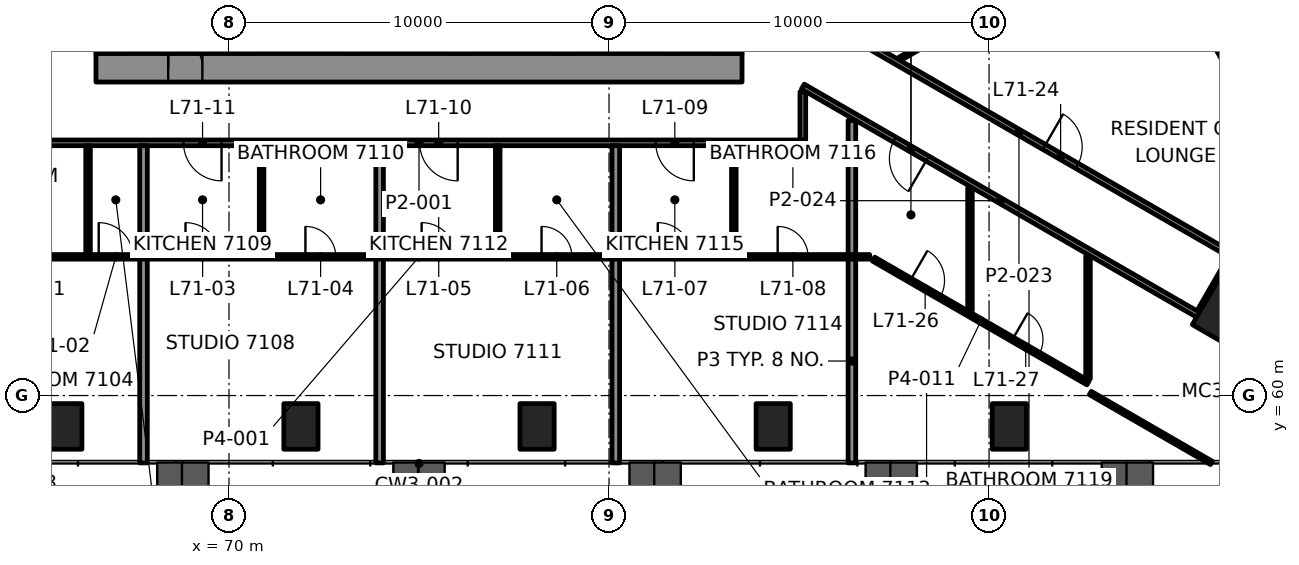
"""IFC4 building model, lengths in metres.
Left out: names, types, materials, properties, quantities, classifications, styles, units other than length and angle.
Written with IfcOpenShell. Run it as: python <this file> out.ifc"""

import sys

from ifc_helpers import new_model, si_unit, direction, frame, frame_2d, origin, origin_2d, place, context, subcontext, project, spatial, rectangle, hollow_rectangle, extrude, element, fill, save


model = new_model("IFC4")
c1 = context("Model", 3, precision=1e-05, world=origin(), true_north=direction((0.0, 1.0)))
c2 = subcontext(c1, "Body", "Model", "MODEL_VIEW")
j1 = project(units=[si_unit("LENGTHUNIT", "METRE"), si_unit("PLANEANGLEUNIT", "RADIAN")], contexts=[c1])
p1 = place(None, origin())
s1 = spatial("IfcSite", under=j1, at=p1, CompositionType="ELEMENT")
p2 = place(p1, origin())
s2 = spatial("IfcBuilding", under=s1, at=p2, CompositionType="ELEMENT")
p3 = place(p2, frame((0.0, 0.0, 295.1)))
s3 = spatial("IfcBuildingStorey", under=s2, at=p3, CompositionType="ELEMENT", Elevation=295.1)
p4 = place(p3, frame((96.988, 62.305, 0.0), z_axis=(0.0, 0.0, 1.0), x_axis=(0.5, 0.866025403784, 0.0)))
e1 = element("IfcColumn", 1, at=p4, inside=s3, PredefinedType="COLUMN", context=c2, shape_type="SweptSolid", body=[
    extrude(rectangle(XDim=2.4, YDim=2.4, at=origin_2d()), origin(), (0.0, 0.0, 1.0), 3.5),
])
for number, where, z_axis, x_axis in (
    (2, (65.68, 59.188, -0.0), (0.0, 0.0, 1.0), (1.0, 0.0, 0.0)),
    (3, (71.893, 59.188, -0.0), (0.0, 0.0, 1.0), (1.0, 0.0, 0.0)),
    (4, (78.107, 59.188, -0.0), (0.0, 0.0, 1.0), (1.0, 0.0, 0.0)),
    (5, (84.32, 59.188, -0.0), (0.0, 0.0, 1.0), (1.0, 0.0, 0.0)),
    (6, (90.533, 59.188, -0.0), (0.0, 0.0, 1.0), (1.0, 0.0, 0.0)),
    (7, (96.461, 69.454, -0.0), (0.0, 0.0, 1.0), (-0.5, 0.866, 0.0)),
):
    element("IfcColumn", number, at=place(p3, frame(where, z_axis=z_axis, x_axis=x_axis)), inside=s3, PredefinedType="COLUMN", context=c2, shape_type="SweptSolid", body=[
        extrude(hollow_rectangle(XDim=0.9, YDim=1.2, WallThickness=0.06, at=origin_2d()), origin(), (0.0, 0.0, 1.0), 3.5),
    ])
p5 = place(p3, frame((66.5, 68.625, 0.0), z_axis=(0.0, 0.0, 1.0), x_axis=(1.0, 0.0, 0.0)))
e8 = element("IfcWall", 8, at=p5, inside=s3, PredefinedType="SHEAR", context=c2, shape_type="SweptSolid", body=[
    extrude(rectangle(XDim=17.0, YDim=0.75, at=frame_2d((8.5, 0.0))), origin(), (0.0, 0.0, 1.0), 3.3),
])
p6 = place(p5, frame((1.9, 0.0, 0.0)))
e9 = element("IfcOpeningElement", 9, at=p6, cuts=e8, PredefinedType="OPENING", context=c2, shape_type="SweptSolid", body=[
    extrude(rectangle(XDim=0.9, YDim=2.1, at=frame_2d((0.45, 1.05))), frame((0.0, 0.385, 0.0), z_axis=(0.0, -1.0, 0.0), x_axis=(1.0, 0.0, 0.0)), (0.0, 0.0, 1.0), 0.77),
])
p7 = place(p3, frame((66.875, 69.0, 0.0), z_axis=(0.0, 0.0, 1.0), x_axis=(0.0, 1.0, 0.0)))
e10 = element("IfcWall", 10, at=p7, inside=s3, PredefinedType="SHEAR", context=c2, shape_type="SweptSolid", body=[
    extrude(rectangle(XDim=12.0, YDim=0.75, at=frame_2d((6.0, 0.0))), origin(), (0.0, 0.0, 1.0), 3.3),
])
p8 = place(p7, frame((3.7, 0.0, 0.0)))
e11 = element("IfcOpeningElement", 11, at=p8, cuts=e10, PredefinedType="OPENING", context=c2, shape_type="SweptSolid", body=[
    extrude(rectangle(XDim=1.2, YDim=2.1, at=frame_2d((0.6, 1.05))), frame((0.0, 0.385, 0.0), z_axis=(0.0, -1.0, 0.0), x_axis=(1.0, 0.0, 0.0)), (0.0, 0.0, 1.0), 0.77),
])
p9 = place(p3, frame((83.125, 69.0, 0.0), z_axis=(0.0, 0.0, 1.0), x_axis=(0.0, 1.0, 0.0)))
e12 = element("IfcWall", 12, at=p9, inside=s3, PredefinedType="SHEAR", context=c2, shape_type="SweptSolid", body=[
    extrude(rectangle(XDim=12.0, YDim=0.75, at=frame_2d((6.0, 0.0))), origin(), (0.0, 0.0, 1.0), 3.3),
])
p10 = place(p9, frame((3.4, 0.0, 0.0)))
e13 = element("IfcOpeningElement", 13, at=p10, cuts=e12, PredefinedType="OPENING", context=c2, shape_type="SweptSolid", body=[
    extrude(rectangle(XDim=1.8, YDim=2.1, at=frame_2d((0.9, 1.05))), frame((0.0, 0.385, 0.0), z_axis=(0.0, -1.0, 0.0), x_axis=(1.0, 0.0, 0.0)), (0.0, 0.0, 1.0), 0.77),
])
for number, where, z_axis, x_axis in (
    (14, (70.45, 69.0, 0.0), (0.0, 0.0, 1.0), (0.0, 1.0, 0.0)),
    (15, (73.25, 69.0, 0.0), (0.0, 0.0, 1.0), (0.0, 1.0, 0.0)),
    (16, (76.05, 69.0, 0.0), (0.0, 0.0, 1.0), (0.0, 1.0, 0.0)),
    (17, (78.85, 69.0, 0.0), (0.0, 0.0, 1.0), (0.0, 1.0, 0.0)),
    (18, (81.65, 69.0, 0.0), (0.0, 0.0, 1.0), (0.0, 1.0, 0.0)),
):
    element("IfcWall", number, at=place(p3, frame(where, z_axis=z_axis, x_axis=x_axis)), inside=s3, PredefinedType="SHEAR", context=c2, shape_type="SweptSolid", body=[
        extrude(rectangle(XDim=2.6, YDim=0.3, at=frame_2d((1.3, 0.0))), origin(), (0.0, 0.0, 1.0), 3.3),
    ])
p11 = place(p3, frame((63.141, 63.65, 0.0), z_axis=(0.0, 0.0, 1.0), x_axis=(1.0, 0.0, 0.0)))
e19 = element("IfcWall", 19, at=p11, inside=s3, PredefinedType="PARTITIONING", context=c2, shape_type="SweptSolid", body=[
    extrude(rectangle(XDim=23.718, YDim=0.12, at=frame_2d((11.859, 0.0))), origin(), (0.0, 0.0, 1.0), 2.7),
])
p12 = place(p11, frame((1.276, 0.0, 0.0)))
e20 = element("IfcOpeningElement", 20, at=p12, cuts=e19, PredefinedType="OPENING", context=c2, shape_type="SweptSolid", body=[
    extrude(rectangle(XDim=0.8, YDim=2.1, at=frame_2d((0.4, 1.05))), frame((0.0, 0.07, 0.0), z_axis=(0.0, -1.0, 0.0), x_axis=(1.0, 0.0, 0.0)), (0.0, 0.0, 1.0), 0.14),
])
p13 = place(p11, frame((3.43, 0.0, 0.0)))
e21 = element("IfcOpeningElement", 21, at=p13, cuts=e19, PredefinedType="OPENING", context=c2, shape_type="SweptSolid", body=[
    extrude(rectangle(XDim=0.9, YDim=2.1, at=frame_2d((0.45, 1.05))), frame((0.0, 0.07, 0.0), z_axis=(0.0, -1.0, 0.0), x_axis=(1.0, 0.0, 0.0)), (0.0, 0.0, 1.0), 0.14),
])
p14 = place(p11, frame((5.715, 0.0, 0.0)))
e22 = element("IfcOpeningElement", 22, at=p14, cuts=e19, PredefinedType="OPENING", context=c2, shape_type="SweptSolid", body=[
    extrude(rectangle(XDim=0.9, YDim=2.1, at=frame_2d((0.45, 1.05))), frame((0.0, 0.07, 0.0), z_axis=(0.0, -1.0, 0.0), x_axis=(1.0, 0.0, 0.0)), (0.0, 0.0, 1.0), 0.14),
])
p15 = place(p11, frame((8.87, 0.0, 0.0)))
e23 = element("IfcOpeningElement", 23, at=p15, cuts=e19, PredefinedType="OPENING", context=c2, shape_type="SweptSolid", body=[
    extrude(rectangle(XDim=0.8, YDim=2.1, at=frame_2d((0.4, 1.05))), frame((0.0, 0.07, 0.0), z_axis=(0.0, -1.0, 0.0), x_axis=(1.0, 0.0, 0.0)), (0.0, 0.0, 1.0), 0.14),
])
p16 = place(p11, frame((11.928, 0.0, 0.0)))
e24 = element("IfcOpeningElement", 24, at=p16, cuts=e19, PredefinedType="OPENING", context=c2, shape_type="SweptSolid", body=[
    extrude(rectangle(XDim=0.9, YDim=2.1, at=frame_2d((0.45, 1.05))), frame((0.0, 0.07, 0.0), z_axis=(0.0, -1.0, 0.0), x_axis=(1.0, 0.0, 0.0)), (0.0, 0.0, 1.0), 0.14),
])
p17 = place(p11, frame((15.083, 0.0, 0.0)))
e25 = element("IfcOpeningElement", 25, at=p17, cuts=e19, PredefinedType="OPENING", context=c2, shape_type="SweptSolid", body=[
    extrude(rectangle(XDim=0.8, YDim=2.1, at=frame_2d((0.4, 1.05))), frame((0.0, 0.07, 0.0), z_axis=(0.0, -1.0, 0.0), x_axis=(1.0, 0.0, 0.0)), (0.0, 0.0, 1.0), 0.14),
])
p18 = place(p11, frame((18.141, 0.0, 0.0)))
e26 = element("IfcOpeningElement", 26, at=p18, cuts=e19, PredefinedType="OPENING", context=c2, shape_type="SweptSolid", body=[
    extrude(rectangle(XDim=0.9, YDim=2.1, at=frame_2d((0.45, 1.05))), frame((0.0, 0.07, 0.0), z_axis=(0.0, -1.0, 0.0), x_axis=(1.0, 0.0, 0.0)), (0.0, 0.0, 1.0), 0.14),
])
p19 = place(p11, frame((21.297, 0.0, 0.0)))
e27 = element("IfcOpeningElement", 27, at=p19, cuts=e19, PredefinedType="OPENING", context=c2, shape_type="SweptSolid", body=[
    extrude(rectangle(XDim=0.8, YDim=2.1, at=frame_2d((0.4, 1.05))), frame((0.0, 0.07, 0.0), z_axis=(0.0, -1.0, 0.0), x_axis=(1.0, 0.0, 0.0)), (0.0, 0.0, 1.0), 0.14),
])
p20 = place(p3, frame((85.1, 66.65, 0.0), z_axis=(0.0, 0.0, 1.0), x_axis=(-1.0, 0.0, 0.0)))
e28 = element("IfcWall", 28, at=p20, inside=s3, PredefinedType="PARTITIONING", context=c2, shape_type="SweptSolid", body=[
    extrude(rectangle(XDim=20.2, YDim=0.15, at=frame_2d((10.1, 0.0))), origin(), (0.0, 0.0, 1.0), 2.7),
])
p21 = place(p20, frame((2.869, 0.0, 0.0)))
e29 = element("IfcOpeningElement", 29, at=p21, cuts=e28, PredefinedType="OPENING", context=c2, shape_type="SweptSolid", body=[
    extrude(rectangle(XDim=1.0, YDim=2.1, at=frame_2d((0.5, 1.05))), frame((0.0, 0.085, 0.0), z_axis=(0.0, -1.0, 0.0), x_axis=(1.0, 0.0, 0.0)), (0.0, 0.0, 1.0), 0.17),
])
p22 = place(p20, frame((9.082, 0.0, 0.0)))
e30 = element("IfcOpeningElement", 30, at=p22, cuts=e28, PredefinedType="OPENING", context=c2, shape_type="SweptSolid", body=[
    extrude(rectangle(XDim=1.0, YDim=2.1, at=frame_2d((0.5, 1.05))), frame((0.0, 0.085, 0.0), z_axis=(0.0, -1.0, 0.0), x_axis=(1.0, 0.0, 0.0)), (0.0, 0.0, 1.0), 0.17),
])
p23 = place(p20, frame((15.296, 0.0, 0.0)))
e31 = element("IfcOpeningElement", 31, at=p23, cuts=e28, PredefinedType="OPENING", context=c2, shape_type="SweptSolid", body=[
    extrude(rectangle(XDim=1.0, YDim=2.1, at=frame_2d((0.5, 1.05))), frame((0.0, 0.085, 0.0), z_axis=(0.0, -1.0, 0.0), x_axis=(1.0, 0.0, 0.0)), (0.0, 0.0, 1.0), 0.17),
])
p24 = place(p3, frame((87.645, 68.855, 0.0), z_axis=(0.0, 0.0, 1.0), x_axis=(0.866023307551, 0.500003630766, 0.0)))
e32 = element("IfcWall", 32, at=p24, inside=s3, PredefinedType="PARTITIONING", context=c2, shape_type="SweptSolid", body=[
    extrude(rectangle(XDim=8.894, YDim=0.1, at=frame_2d((4.447, 0.0))), origin(), (0.0, 0.0, 1.0), 2.688),
])
p25 = place(p3, frame((95.536, 62.191, 0.0), z_axis=(0.0, 0.0, 1.0), x_axis=(0.500008692254, 0.866020385251, 0.0)))
e33 = element("IfcWall", 33, at=p25, inside=s3, PredefinedType="PARTITIONING", context=c2, shape_type="SweptSolid", body=[
    extrude(rectangle(XDim=1.649, YDim=0.15, at=frame_2d((0.824, 0.0))), origin(), (0.0, 0.0, 1.0), 2.547),
])
p26 = place(p3, frame((92.604, 60.442, 0.0), z_axis=(0.0, 0.0, 1.0), x_axis=(0.0, 1.0, 0.0)))
e34 = element("IfcWall", 34, at=p26, inside=s3, PredefinedType="PARTITIONING", context=c2, shape_type="SweptSolid", body=[
    extrude(rectangle(XDim=3.228, YDim=0.12, at=frame_2d((1.614, 0.0))), origin(), (0.0, 0.0, 1.0), 2.7),
])
p27 = place(p3, frame((89.498, 62.236, 0.0), z_axis=(0.0, 0.0, 1.0), x_axis=(0.0, 1.0, 0.0)))
e35 = element("IfcWall", 35, at=p27, inside=s3, PredefinedType="PARTITIONING", context=c2, shape_type="SweptSolid", body=[
    extrude(rectangle(XDim=3.228, YDim=0.12, at=frame_2d((1.614, 0.0))), origin(), (0.0, 0.0, 1.0), 2.547),
])
p28 = place(p3, frame((86.391, 58.228, 0.0), z_axis=(0.0, 0.0, 1.0), x_axis=(0.0, 1.0, 0.0)))
e36 = element("IfcWall", 36, at=p28, inside=s3, PredefinedType="PARTITIONING", context=c2, shape_type="SweptSolid", body=[
    extrude(rectangle(XDim=5.363, YDim=0.2, at=frame_2d((2.681, 0.0))), origin(), (0.0, 0.0, 1.0), 2.7),
])
p29 = place(p3, frame((85.1, 66.725, 0.0), z_axis=(0.0, 0.0, 1.0), x_axis=(0.0, 1.0, 0.0)))
e37 = element("IfcWall", 37, at=p29, inside=s3, PredefinedType="PARTITIONING", context=c2, shape_type="SweptSolid", body=[
    extrude(rectangle(XDim=1.268, YDim=0.15, at=frame_2d((0.634, 0.0))), origin(), (0.0, 0.0, 1.0), 2.547),
])
p30 = place(p3, frame((83.284, 63.71, 0.0), z_axis=(0.0, 0.0, 1.0), x_axis=(0.0, 1.0, 0.0)))
e38 = element("IfcWall", 38, at=p30, inside=s3, PredefinedType="PARTITIONING", context=c2, shape_type="SweptSolid", body=[
    extrude(rectangle(XDim=2.865, YDim=0.12, at=frame_2d((1.433, 0.0))), origin(), (0.0, 0.0, 1.0), 2.7),
])
p31 = place(p3, frame((80.178, 58.228, 0.0), z_axis=(0.0, 0.0, 1.0), x_axis=(0.0, 1.0, 0.0)))
e39 = element("IfcWall", 39, at=p31, inside=s3, PredefinedType="PARTITIONING", context=c2, shape_type="SweptSolid", body=[
    extrude(rectangle(XDim=5.363, YDim=0.2, at=frame_2d((2.681, 0.0))), origin(), (0.0, 0.0, 1.0), 2.688),
])
p32 = place(p3, frame((77.071, 63.71, 0.0), z_axis=(0.0, 0.0, 1.0), x_axis=(0.0, 1.0, 0.0)))
e40 = element("IfcWall", 40, at=p32, inside=s3, PredefinedType="PARTITIONING", context=c2, shape_type="SweptSolid", body=[
    extrude(rectangle(XDim=2.865, YDim=0.12, at=frame_2d((1.433, 0.0))), origin(), (0.0, 0.0, 1.0), 2.7),
])
p33 = place(p3, frame((73.964, 58.228, 0.0), z_axis=(0.0, 0.0, 1.0), x_axis=(0.0, 1.0, 0.0)))
e41 = element("IfcWall", 41, at=p33, inside=s3, PredefinedType="PARTITIONING", context=c2, shape_type="SweptSolid", body=[
    extrude(rectangle(XDim=5.363, YDim=0.2, at=frame_2d((2.681, 0.0))), origin(), (0.0, 0.0, 1.0), 2.688),
])
p34 = place(p3, frame((70.858, 63.71, 0.0), z_axis=(0.0, 0.0, 1.0), x_axis=(0.0, 1.0, 0.0)))
e42 = element("IfcWall", 42, at=p34, inside=s3, PredefinedType="PARTITIONING", context=c2, shape_type="SweptSolid", body=[
    extrude(rectangle(XDim=2.865, YDim=0.12, at=frame_2d((1.433, 0.0))), origin(), (0.0, 0.0, 1.0), 2.7),
])
p35 = place(p3, frame((67.751, 58.228, 0.0), z_axis=(0.0, 0.0, 1.0), x_axis=(0.0, 1.0, 0.0)))
e43 = element("IfcWall", 43, at=p35, inside=s3, PredefinedType="PARTITIONING", context=c2, shape_type="SweptSolid", body=[
    extrude(rectangle(XDim=5.363, YDim=0.2, at=frame_2d((2.681, 0.0))), origin(), (0.0, 0.0, 1.0), 2.688),
])
p36 = place(p3, frame((66.292, 63.71, 0.0), z_axis=(0.0, 0.0, 1.0), x_axis=(0.0, 1.0, 0.0)))
e44 = element("IfcWall", 44, at=p36, inside=s3, PredefinedType="PARTITIONING", context=c2, shape_type="SweptSolid", body=[
    extrude(rectangle(XDim=2.865, YDim=0.12, at=frame_2d((1.433, 0.0))), origin(), (0.0, 0.0, 1.0), 2.7),
])
p37 = place(p3, frame((85.175, 70.165, 0.0), z_axis=(0.0, 0.0, 1.0), x_axis=(0.866023706001, -0.500002940635, 0.0)))
e45 = element("IfcWall", 45, at=p37, inside=s3, PredefinedType="PARTITIONING", context=c2, shape_type="SweptSolid", body=[
    extrude(rectangle(XDim=12.959, YDim=0.15, at=frame_2d((6.48, 0.0))), origin(), (0.0, 0.0, 1.0), 2.7),
])
p38 = place(p37, frame((7.246, 0.0, 0.0)))
e46 = element("IfcOpeningElement", 46, at=p38, cuts=e45, PredefinedType="OPENING", context=c2, shape_type="SweptSolid", body=[
    extrude(rectangle(XDim=1.0, YDim=2.1, at=frame_2d((0.5, 1.05))), frame((0.0, 0.085, 0.0), z_axis=(0.0, -1.0, 0.0), x_axis=(1.0, 0.0, 0.0)), (0.0, 0.0, 1.0), 0.17),
])
p39 = place(p3, frame((95.498, 62.126, 0.0), z_axis=(0.0, 0.0, 1.0), x_axis=(-0.866024746207, 0.500001138955, 0.0)))
e47 = element("IfcWall", 47, at=p39, inside=s3, PredefinedType="PARTITIONING", context=c2, shape_type="SweptSolid", body=[
    extrude(rectangle(XDim=12.007, YDim=0.15, at=frame_2d((6.003, 0.0))), origin(), (0.0, 0.0, 1.0), 2.547),
])
p40 = place(p39, frame((8.222, 0.0, 0.0)))
e48 = element("IfcOpeningElement", 48, at=p40, cuts=e47, PredefinedType="OPENING", context=c2, shape_type="SweptSolid", body=[
    extrude(rectangle(XDim=1.0, YDim=2.1, at=frame_2d((0.5, 1.05))), frame((0.0, 0.085, 0.0), z_axis=(0.0, -1.0, 0.0), x_axis=(1.0, 0.0, 0.0)), (0.0, 0.0, 1.0), 0.17),
])
p41 = place(p3, frame((86.963, 63.59, 0.0), z_axis=(0.0, 0.0, 1.0), x_axis=(0.866025198843, -0.500000354968, 0.0)))
e49 = element("IfcWall", 49, at=p41, inside=s3, PredefinedType="PARTITIONING", context=c2, shape_type="SweptSolid", body=[
    extrude(rectangle(XDim=6.515, YDim=0.12, at=frame_2d((3.257, 0.0))), origin(), (0.0, 0.0, 1.0), 2.7),
])
p42 = place(p41, frame((1.115, 0.0, 0.0)))
e50 = element("IfcOpeningElement", 50, at=p42, cuts=e49, PredefinedType="OPENING", context=c2, shape_type="SweptSolid", body=[
    extrude(rectangle(XDim=0.9, YDim=2.1, at=frame_2d((0.45, 1.05))), frame((0.0, 0.07, 0.0), z_axis=(0.0, -1.0, 0.0), x_axis=(1.0, 0.0, 0.0)), (0.0, 0.0, 1.0), 0.14),
])
p43 = place(p41, frame((4.221, 0.0, 0.0)))
e51 = element("IfcOpeningElement", 51, at=p43, cuts=e49, PredefinedType="OPENING", context=c2, shape_type="SweptSolid", body=[
    extrude(rectangle(XDim=0.8, YDim=2.1, at=frame_2d((0.4, 1.05))), frame((0.0, 0.07, 0.0), z_axis=(0.0, -1.0, 0.0), x_axis=(1.0, 0.0, 0.0)), (0.0, 0.0, 1.0), 0.14),
])
p44 = place(p3, frame((95.851, 58.228, 0.0), z_axis=(0.0, 0.0, 1.0), x_axis=(-0.866025356753, 0.50000008146, 0.0)))
e52 = element("IfcWall", 52, at=p44, inside=s3, PredefinedType="PARTITIONING", context=c2, shape_type="SweptSolid", body=[
    extrude(rectangle(XDim=3.679, YDim=0.1, at=frame_2d((1.84, 0.0))), origin(), (0.0, 0.0, 1.0), 2.7),
])
p45 = place(p3, frame((86.391, 63.71, 0.0), z_axis=(0.0, 0.0, 1.0), x_axis=(0.0, 1.0, 0.0)))
e53 = element("IfcWall", 53, at=p45, inside=s3, PredefinedType="PARTITIONING", context=c2, shape_type="SweptSolid", body=[
    extrude(rectangle(XDim=3.528, YDim=0.2, at=frame_2d((1.764, 0.0))), origin(), (0.0, 0.0, 1.0), 2.547),
])
for number, where, z_axis, x_axis in (
    (54, (80.178, 63.71, 0.0), (0.0, 0.0, 1.0), (0.0, 1.0, 0.0)),
    (55, (73.964, 63.71, 0.0), (0.0, 0.0, 1.0), (0.0, 1.0, 0.0)),
    (56, (67.751, 63.71, 0.0), (0.0, 0.0, 1.0), (0.0, 1.0, 0.0)),
):
    element("IfcWall", number, at=place(p3, frame(where, z_axis=z_axis, x_axis=x_axis)), inside=s3, PredefinedType="PARTITIONING", context=c2, shape_type="SweptSolid", body=[
        extrude(rectangle(XDim=2.865, YDim=0.2, at=frame_2d((1.433, 0.0))), origin(), (0.0, 0.0, 1.0), 2.7),
    ])
p46 = place(p13, origin())
e57 = element("IfcDoor", 57, at=p46, inside=s3, OperationType="SINGLE_SWING_LEFT", PredefinedType="DOOR", context=c2, shape_type="SweptSolid", body=[
    extrude(rectangle(XDim=0.9, YDim=2.1, at=frame_2d((0.45, 1.05))), frame((0.0, 0.025, 0.0), z_axis=(0.0, -1.0, 0.0), x_axis=(1.0, 0.0, 0.0)), (0.0, 0.0, 1.0), 0.05),
])
fill(e21, e57)
p47 = place(p14, origin())
e58 = element("IfcDoor", 58, at=p47, inside=s3, OperationType="SINGLE_SWING_LEFT", PredefinedType="DOOR", context=c2, shape_type="SweptSolid", body=[
    extrude(rectangle(XDim=0.9, YDim=2.1, at=frame_2d((0.45, 1.05))), frame((0.0, 0.025, 0.0), z_axis=(0.0, -1.0, 0.0), x_axis=(1.0, 0.0, 0.0)), (0.0, 0.0, 1.0), 0.05),
])
fill(e22, e58)
p48 = place(p15, origin())
e59 = element("IfcDoor", 59, at=p48, inside=s3, OperationType="SINGLE_SWING_LEFT", PredefinedType="DOOR", context=c2, shape_type="SweptSolid", body=[
    extrude(rectangle(XDim=0.8, YDim=2.1, at=frame_2d((0.4, 1.05))), frame((0.0, 0.025, 0.0), z_axis=(0.0, -1.0, 0.0), x_axis=(1.0, 0.0, 0.0)), (0.0, 0.0, 1.0), 0.05),
])
fill(e23, e59)
p49 = place(p16, origin())
e60 = element("IfcDoor", 60, at=p49, inside=s3, OperationType="SINGLE_SWING_RIGHT", PredefinedType="DOOR", context=c2, shape_type="SweptSolid", body=[
    extrude(rectangle(XDim=0.9, YDim=2.1, at=frame_2d((0.45, 1.05))), frame((0.0, 0.025, 0.0), z_axis=(0.0, -1.0, 0.0), x_axis=(1.0, 0.0, 0.0)), (0.0, 0.0, 1.0), 0.05),
])
fill(e24, e60)
p50 = place(p17, origin())
e61 = element("IfcDoor", 61, at=p50, inside=s3, OperationType="SINGLE_SWING_RIGHT", PredefinedType="DOOR", context=c2, shape_type="SweptSolid", body=[
    extrude(rectangle(XDim=0.8, YDim=2.1, at=frame_2d((0.4, 1.05))), frame((0.0, 0.025, 0.0), z_axis=(0.0, -1.0, 0.0), x_axis=(1.0, 0.0, 0.0)), (0.0, 0.0, 1.0), 0.05),
])
fill(e25, e61)
p51 = place(p18, origin())
e62 = element("IfcDoor", 62, at=p51, inside=s3, OperationType="SINGLE_SWING_LEFT", PredefinedType="DOOR", context=c2, shape_type="SweptSolid", body=[
    extrude(rectangle(XDim=0.9, YDim=2.1, at=frame_2d((0.45, 1.05))), frame((0.0, 0.025, 0.0), z_axis=(0.0, -1.0, 0.0), x_axis=(1.0, 0.0, 0.0)), (0.0, 0.0, 1.0), 0.05),
])
fill(e26, e62)
p52 = place(p19, origin())
e63 = element("IfcDoor", 63, at=p52, inside=s3, OperationType="SINGLE_SWING_LEFT", PredefinedType="DOOR", context=c2, shape_type="SweptSolid", body=[
    extrude(rectangle(XDim=0.8, YDim=2.1, at=frame_2d((0.4, 1.05))), frame((0.0, 0.025, 0.0), z_axis=(0.0, -1.0, 0.0), x_axis=(1.0, 0.0, 0.0)), (0.0, 0.0, 1.0), 0.05),
])
fill(e27, e63)
p53 = place(p21, origin())
e64 = element("IfcDoor", 64, at=p53, inside=s3, OperationType="SINGLE_SWING_LEFT", PredefinedType="DOOR", context=c2, shape_type="SweptSolid", body=[
    extrude(rectangle(XDim=1.0, YDim=2.1, at=frame_2d((0.5, 1.05))), frame((0.0, 0.025, 0.0), z_axis=(0.0, -1.0, 0.0), x_axis=(1.0, 0.0, 0.0)), (0.0, 0.0, 1.0), 0.05),
])
fill(e29, e64)
p54 = place(p22, origin())
e65 = element("IfcDoor", 65, at=p54, inside=s3, OperationType="SINGLE_SWING_RIGHT", PredefinedType="DOOR", context=c2, shape_type="SweptSolid", body=[
    extrude(rectangle(XDim=1.0, YDim=2.1, at=frame_2d((0.5, 1.05))), frame((0.0, 0.025, 0.0), z_axis=(0.0, -1.0, 0.0), x_axis=(1.0, 0.0, 0.0)), (0.0, 0.0, 1.0), 0.05),
])
fill(e30, e65)
p55 = place(p23, origin())
e66 = element("IfcDoor", 66, at=p55, inside=s3, OperationType="SINGLE_SWING_LEFT", PredefinedType="DOOR", context=c2, shape_type="SweptSolid", body=[
    extrude(rectangle(XDim=1.0, YDim=2.1, at=frame_2d((0.5, 1.05))), frame((0.0, 0.025, 0.0), z_axis=(0.0, -1.0, 0.0), x_axis=(1.0, 0.0, 0.0)), (0.0, 0.0, 1.0), 0.05),
])
fill(e31, e66)
p56 = place(p38, origin())
e67 = element("IfcDoor", 67, at=p56, inside=s3, OperationType="SINGLE_SWING_RIGHT", PredefinedType="DOOR", context=c2, shape_type="SweptSolid", body=[
    extrude(rectangle(XDim=1.0, YDim=2.1, at=frame_2d((0.5, 1.05))), frame((0.0, 0.025, 0.0), z_axis=(0.0, -1.0, 0.0), x_axis=(1.0, 0.0, 0.0)), (0.0, 0.0, 1.0), 0.05),
])
fill(e46, e67)
p57 = place(p40, origin())
e68 = element("IfcDoor", 68, at=p57, inside=s3, OperationType="SINGLE_SWING_LEFT", PredefinedType="DOOR", context=c2, shape_type="SweptSolid", body=[
    extrude(rectangle(XDim=1.0, YDim=2.1, at=frame_2d((0.5, 1.05))), frame((0.0, 0.025, 0.0), z_axis=(0.0, -1.0, 0.0), x_axis=(1.0, 0.0, 0.0)), (0.0, 0.0, 1.0), 0.05),
])
fill(e48, e68)
p58 = place(p42, origin())
e69 = element("IfcDoor", 69, at=p58, inside=s3, OperationType="SINGLE_SWING_LEFT", PredefinedType="DOOR", context=c2, shape_type="SweptSolid", body=[
    extrude(rectangle(XDim=0.9, YDim=2.1, at=frame_2d((0.45, 1.05))), frame((0.0, 0.025, 0.0), z_axis=(0.0, -1.0, 0.0), x_axis=(1.0, 0.0, 0.0)), (0.0, 0.0, 1.0), 0.05),
])
fill(e50, e69)
p59 = place(p43, origin())
e70 = element("IfcDoor", 70, at=p59, inside=s3, OperationType="SINGLE_SWING_LEFT", PredefinedType="DOOR", context=c2, shape_type="SweptSolid", body=[
    extrude(rectangle(XDim=0.8, YDim=2.1, at=frame_2d((0.4, 1.05))), frame((0.0, 0.025, 0.0), z_axis=(0.0, -1.0, 0.0), x_axis=(1.0, 0.0, 0.0)), (0.0, 0.0, 1.0), 0.05),
])
fill(e51, e70)
p60 = place(p6, origin())
e71 = element("IfcDoor", 71, at=p60, inside=s3, OperationType="SINGLE_SWING_RIGHT", PredefinedType="DOOR", context=c2, shape_type="SweptSolid", body=[
    extrude(rectangle(XDim=0.9, YDim=2.1, at=frame_2d((0.45, 1.05))), frame((0.0, 0.095, 0.0), z_axis=(0.0, -1.0, 0.0), x_axis=(1.0, 0.0, 0.0)), (0.0, 0.0, 1.0), 0.19),
])
fill(e9, e71)
save(model, sys.argv[1])
